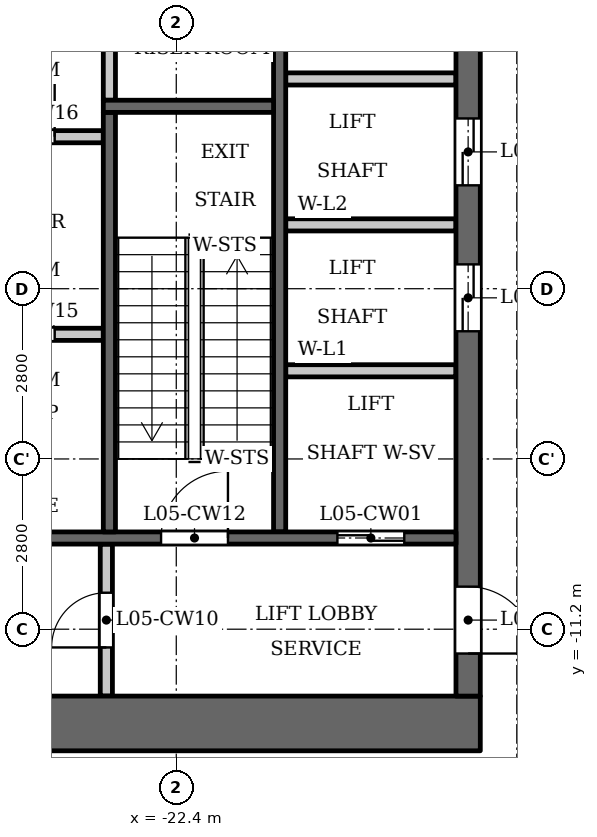
"""IFC4 building model, lengths in metres.
Left out: names, types, materials, properties, quantities, classifications, styles, units other than length and angle.
Written with IfcOpenShell. Run it as: python <this file> out.ifc"""

import sys

from ifc_helpers import new_model, si_unit, direction, frame, frame_2d, origin, place, context, subcontext, project, spatial, rectangle, extrude, element, fill, save


model = new_model("IFC4")
c1 = context("Model", 3, precision=1e-05, world=origin(), true_north=direction((0.0, 1.0)))
c2 = subcontext(c1, "Body", "Model", "MODEL_VIEW")
j1 = project(units=[si_unit("LENGTHUNIT", "METRE"), si_unit("PLANEANGLEUNIT", "RADIAN")], contexts=[c1])
p1 = place(None, origin())
s1 = spatial("IfcSite", under=j1, at=p1, CompositionType="ELEMENT")
p2 = place(p1, origin())
s2 = spatial("IfcBuilding", under=s1, at=p2, CompositionType="ELEMENT")
p3 = place(p2, frame((0.0, 0.0, 25.7)))
s3 = spatial("IfcBuildingStorey", under=s2, at=p3, CompositionType="ELEMENT", Elevation=25.7)
p4 = place(p3, frame((-23.5, -2.5, 0.0), z_axis=(0.0, 0.0, 1.0), x_axis=(0.0, 1.0, 0.0)))
e1 = element("IfcWall", 1, at=p4, inside=s3, PredefinedType="PARTITIONING", context=c2, shape_type="SweptSolid", body=[
    extrude(rectangle(XDim=2.65, YDim=0.2, at=frame_2d((1.325, 0.0))), origin(), (0.0, 0.0, 1.0), 4.45),
])
p5 = place(p3, frame((-20.7, -9.6, 0.0), z_axis=(0.0, 0.0, 1.0), x_axis=(0.0, 1.0, 0.0)))
e2 = element("IfcWall", 2, at=p5, inside=s3, PredefinedType="SHEAR", context=c2, shape_type="SweptSolid", body=[
    extrude(rectangle(XDim=9.75, YDim=0.2, at=frame_2d((4.875, 0.0))), origin(), (0.0, 0.0, 1.0), 4.45),
])
p6 = place(p3, frame((-17.4, -12.75, 0.0), z_axis=(0.0, 0.0, 1.0), x_axis=(-1.0, 0.0, 0.0)))
e3 = element("IfcWall", 3, at=p6, inside=s3, PredefinedType="SHEAR", context=c2, shape_type="SweptSolid", body=[
    extrude(rectangle(XDim=10.4, YDim=0.9, at=frame_2d((5.2, 0.0))), origin(), (0.0, 0.0, 1.0), 4.45),
])
p7 = place(p3, frame((-17.6, -12.3, 0.0), z_axis=(0.0, 0.0, 1.0), x_axis=(0.0, 1.0, 0.0)))
e4 = element("IfcWall", 4, at=p7, inside=s3, PredefinedType="SHEAR", context=c2, shape_type="SweptSolid", body=[
    extrude(rectangle(XDim=24.6, YDim=0.4, at=frame_2d((12.3, 0.0))), origin(), (0.0, 0.0, 1.0), 4.45),
])
p8 = place(p7, frame((6.0, 0.0, 0.0)))
e5 = element("IfcOpeningElement", 5, at=p8, cuts=e4, PredefinedType="OPENING", context=c2, shape_type="SweptSolid", body=[
    extrude(rectangle(XDim=1.1, YDim=2.1, at=frame_2d((0.55, 1.05))), frame((0.0, 0.21, 0.0), z_axis=(0.0, -1.0, 0.0), x_axis=(1.0, 0.0, 0.0)), (0.0, 0.0, 1.0), 0.42),
])
p9 = place(p7, frame((8.4, 0.0, 0.0)))
e6 = element("IfcOpeningElement", 6, at=p9, cuts=e4, PredefinedType="OPENING", context=c2, shape_type="SweptSolid", body=[
    extrude(rectangle(XDim=1.1, YDim=2.1, at=frame_2d((0.55, 1.05))), frame((0.0, 0.21, 0.0), z_axis=(0.0, -1.0, 0.0), x_axis=(1.0, 0.0, 0.0)), (0.0, 0.0, 1.0), 0.42),
])
p10 = place(p7, frame((10.8, 0.0, 0.0)))
e7 = element("IfcOpeningElement", 7, at=p10, cuts=e4, PredefinedType="OPENING", context=c2, shape_type="SweptSolid", body=[
    extrude(rectangle(XDim=1.1, YDim=2.1, at=frame_2d((0.55, 1.05))), frame((0.0, 0.21, 0.0), z_axis=(0.0, -1.0, 0.0), x_axis=(1.0, 0.0, 0.0)), (0.0, 0.0, 1.0), 0.42),
])
p11 = place(p7, frame((16.75, 0.0, 0.0)))
e8 = element("IfcOpeningElement", 8, at=p11, cuts=e4, PredefinedType="OPENING", context=c2, shape_type="SweptSolid", body=[
    extrude(rectangle(XDim=0.9, YDim=2.1, at=frame_2d((0.45, 1.05))), frame((0.0, 0.21, 0.0), z_axis=(0.0, -1.0, 0.0), x_axis=(1.0, 0.0, 0.0)), (0.0, 0.0, 1.0), 0.42),
])
p12 = place(p7, frame((22.8, 0.0, 0.0)))
e9 = element("IfcOpeningElement", 9, at=p12, cuts=e4, PredefinedType="OPENING", context=c2, shape_type="SweptSolid", body=[
    extrude(rectangle(XDim=1.1, YDim=2.1, at=frame_2d((0.55, 1.05))), frame((0.0, 0.21, 0.0), z_axis=(0.0, -1.0, 0.0), x_axis=(1.0, 0.0, 0.0)), (0.0, 0.0, 1.0), 0.42),
])
p13 = place(p7, frame((0.7, 0.0, 0.0)))
e10 = element("IfcOpeningElement", 10, at=p13, cuts=e4, PredefinedType="OPENING", context=c2, shape_type="SweptSolid", body=[
    extrude(rectangle(XDim=1.1, YDim=2.1, at=frame_2d((0.55, 1.05))), frame((0.0, 0.21, 0.0), z_axis=(0.0, -1.0, 0.0), x_axis=(1.0, 0.0, 0.0)), (0.0, 0.0, 1.0), 0.42),
])
p14 = place(p7, frame((12.775, 0.0, 0.0)))
e11 = element("IfcOpeningElement", 11, at=p14, cuts=e4, PredefinedType="OPENING", context=c2, shape_type="SweptSolid", body=[
    extrude(rectangle(XDim=1.8, YDim=2.1, at=frame_2d((0.9, 1.05))), frame((0.0, 0.21, 0.0), z_axis=(0.0, -1.0, 0.0), x_axis=(1.0, 0.0, 0.0)), (0.0, 0.0, 1.0), 0.42),
])
p15 = place(p3, frame((-23.55, -12.3, 0.0), z_axis=(0.0, 0.0, 1.0), x_axis=(0.0, 1.0, 0.0)))
e12 = element("IfcWall", 12, at=p15, inside=s3, PredefinedType="PARTITIONING", context=c2, shape_type="SweptSolid", body=[
    extrude(rectangle(XDim=2.5, YDim=0.2, at=frame_2d((1.25, 0.0))), origin(), (0.0, 0.0, 1.0), 4.45),
])
p16 = place(p15, frame((0.8, 0.0, 0.0)))
e13 = element("IfcOpeningElement", 13, at=p16, cuts=e12, PredefinedType="OPENING", context=c2, shape_type="SweptSolid", body=[
    extrude(rectangle(XDim=0.9, YDim=2.1, at=frame_2d((0.45, 1.05))), frame((0.0, 0.11, 0.0), z_axis=(0.0, -1.0, 0.0), x_axis=(1.0, 0.0, 0.0)), (0.0, 0.0, 1.0), 0.22),
])
p17 = place(p3, frame((-23.6, -6.35, 0.0), z_axis=(0.0, 0.0, 1.0), x_axis=(-1.0, 0.0, 0.0)))
e14 = element("IfcWall", 14, at=p17, inside=s3, PredefinedType="PARTITIONING", context=c2, shape_type="SweptSolid", body=[
    extrude(rectangle(XDim=2.5, YDim=0.2, at=frame_2d((1.25, 0.0))), origin(), (0.0, 0.0, 1.0), 4.45),
])
p18 = place(p17, frame((0.8, 0.0, 0.0)))
e15 = element("IfcOpeningElement", 15, at=p18, cuts=e14, PredefinedType="OPENING", context=c2, shape_type="SweptSolid", body=[
    extrude(rectangle(XDim=0.9, YDim=2.1, at=frame_2d((0.45, 1.05))), frame((0.0, 0.11, 0.0), z_axis=(0.0, -1.0, 0.0), x_axis=(1.0, 0.0, 0.0)), (0.0, 0.0, 1.0), 0.22),
])
p19 = place(p3, frame((-23.6, -3.1, 0.0), z_axis=(0.0, 0.0, 1.0), x_axis=(-1.0, 0.0, 0.0)))
e16 = element("IfcWall", 16, at=p19, inside=s3, PredefinedType="PARTITIONING", context=c2, shape_type="SweptSolid", body=[
    extrude(rectangle(XDim=2.5, YDim=0.2, at=frame_2d((1.25, 0.0))), origin(), (0.0, 0.0, 1.0), 4.45),
])
p20 = place(p19, frame((0.8, 0.0, 0.0)))
e17 = element("IfcOpeningElement", 17, at=p20, cuts=e16, PredefinedType="OPENING", context=c2, shape_type="SweptSolid", body=[
    extrude(rectangle(XDim=0.9, YDim=2.1, at=frame_2d((0.45, 1.05))), frame((0.0, 0.11, 0.0), z_axis=(0.0, -1.0, 0.0), x_axis=(1.0, 0.0, 0.0)), (0.0, 0.0, 1.0), 0.22),
])
p21 = place(p3, frame((-17.8, -9.7, 0.0), z_axis=(0.0, 0.0, 1.0), x_axis=(-1.0, 0.0, 0.0)))
e18 = element("IfcWall", 18, at=p21, inside=s3, PredefinedType="SHEAR", context=c2, shape_type="SweptSolid", body=[
    extrude(rectangle(XDim=8.3, YDim=0.2, at=frame_2d((4.15, 0.0))), origin(), (0.0, 0.0, 1.0), 4.45),
])
p22 = place(p21, frame((0.85, 0.0, 0.0)))
e19 = element("IfcOpeningElement", 19, at=p22, cuts=e18, PredefinedType="OPENING", context=c2, shape_type="SweptSolid", body=[
    extrude(rectangle(XDim=1.1, YDim=2.1, at=frame_2d((0.55, 1.05))), frame((0.0, 0.11, 0.0), z_axis=(0.0, -1.0, 0.0), x_axis=(1.0, 0.0, 0.0)), (0.0, 0.0, 1.0), 0.22),
])
p23 = place(p21, frame((3.75, 0.0, 0.0)))
e20 = element("IfcOpeningElement", 20, at=p23, cuts=e18, PredefinedType="OPENING", context=c2, shape_type="SweptSolid", body=[
    extrude(rectangle(XDim=1.1, YDim=2.1, at=frame_2d((0.55, 1.05))), frame((0.0, 0.11, 0.0), z_axis=(0.0, -1.0, 0.0), x_axis=(1.0, 0.0, 0.0)), (0.0, 0.0, 1.0), 0.22),
])
for number, where, z_axis, x_axis in (
    (21, (-17.8, -6.95, 0.0), (0.0, 0.0, 1.0), (-1.0, 0.0, 0.0)),
    (22, (-17.8, -4.55, 0.0), (0.0, 0.0, 1.0), (-1.0, 0.0, 0.0)),
    (23, (-17.8, -2.15, 0.0), (0.0, 0.0, 1.0), (-1.0, 0.0, 0.0)),
):
    element("IfcWall", number, at=place(p3, frame(where, z_axis=z_axis, x_axis=x_axis)), inside=s3, PredefinedType="PARTITIONING", context=c2, shape_type="SweptSolid", body=[
        extrude(rectangle(XDim=2.8, YDim=0.2, at=frame_2d((1.4, 0.0))), origin(), (0.0, 0.0, 1.0), 4.45),
    ])
p24 = place(p3, frame((-23.5, -9.6, 0.0), z_axis=(0.0, 0.0, 1.0), x_axis=(0.0, 1.0, 0.0)))
e24 = element("IfcWall", 24, at=p24, inside=s3, PredefinedType="SHEAR", context=c2, shape_type="SweptSolid", body=[
    extrude(rectangle(XDim=6.9, YDim=0.2, at=frame_2d((3.45, 0.0))), origin(), (0.0, 0.0, 1.0), 4.45),
])
p25 = place(p3, frame((-20.8, -2.6, 0.0), z_axis=(0.0, 0.0, 1.0), x_axis=(-1.0, 0.0, 0.0)))
e25 = element("IfcWall", 25, at=p25, inside=s3, PredefinedType="SHEAR", context=c2, shape_type="SweptSolid", body=[
    extrude(rectangle(XDim=2.8, YDim=0.2, at=frame_2d((1.4, 0.0))), origin(), (0.0, 0.0, 1.0), 4.45),
])
p26 = place(p22, origin())
e26 = element("IfcDoor", 26, at=p26, inside=s3, OperationType="DOUBLE_DOOR_SLIDING", PredefinedType="DOOR", context=c2, shape_type="SweptSolid", body=[
    extrude(rectangle(XDim=1.1, YDim=2.1, at=frame_2d((0.55, 1.05))), frame((0.0, 0.025, 0.0), z_axis=(0.0, -1.0, 0.0), x_axis=(1.0, 0.0, 0.0)), (0.0, 0.0, 1.0), 0.05),
])
fill(e19, e26)
p27 = place(p8, origin())
e27 = element("IfcDoor", 27, at=p27, inside=s3, OperationType="DOUBLE_DOOR_SLIDING", PredefinedType="DOOR", context=c2, shape_type="SweptSolid", body=[
    extrude(rectangle(XDim=1.1, YDim=2.1, at=frame_2d((0.55, 1.05))), frame((0.0, 0.025, 0.0), z_axis=(0.0, -1.0, 0.0), x_axis=(1.0, 0.0, 0.0)), (0.0, 0.0, 1.0), 0.05),
])
fill(e5, e27)
p28 = place(p9, origin())
e28 = element("IfcDoor", 28, at=p28, inside=s3, OperationType="DOUBLE_DOOR_SLIDING", PredefinedType="DOOR", context=c2, shape_type="SweptSolid", body=[
    extrude(rectangle(XDim=1.1, YDim=2.1, at=frame_2d((0.55, 1.05))), frame((0.0, 0.025, 0.0), z_axis=(0.0, -1.0, 0.0), x_axis=(1.0, 0.0, 0.0)), (0.0, 0.0, 1.0), 0.05),
])
fill(e6, e28)
p29 = place(p13, origin())
e29 = element("IfcDoor", 29, at=p29, inside=s3, OperationType="SINGLE_SWING_LEFT", PredefinedType="DOOR", context=c2, shape_type="SweptSolid", body=[
    extrude(rectangle(XDim=1.1, YDim=2.1, at=frame_2d((0.55, 1.05))), frame((0.0, 0.025, 0.0), z_axis=(0.0, -1.0, 0.0), x_axis=(1.0, 0.0, 0.0)), (0.0, 0.0, 1.0), 0.05),
])
fill(e10, e29)
p30 = place(p16, origin())
e30 = element("IfcDoor", 30, at=p30, inside=s3, OperationType="SINGLE_SWING_RIGHT", PredefinedType="DOOR", context=c2, shape_type="SweptSolid", body=[
    extrude(rectangle(XDim=0.9, YDim=2.1, at=frame_2d((0.45, 1.05))), frame((0.0, 0.025, 0.0), z_axis=(0.0, -1.0, 0.0), x_axis=(1.0, 0.0, 0.0)), (0.0, 0.0, 1.0), 0.05),
])
fill(e13, e30)
p31 = place(p23, origin())
e31 = element("IfcDoor", 31, at=p31, inside=s3, OperationType="SINGLE_SWING_LEFT", PredefinedType="DOOR", context=c2, shape_type="SweptSolid", body=[
    extrude(rectangle(XDim=1.1, YDim=2.1, at=frame_2d((0.55, 1.05))), frame((0.0, 0.025, 0.0), z_axis=(0.0, -1.0, 0.0), x_axis=(1.0, 0.0, 0.0)), (0.0, 0.0, 1.0), 0.05),
])
fill(e20, e31)
p32 = place(p18, origin())
e32 = element("IfcDoor", 32, at=p32, inside=s3, OperationType="SINGLE_SWING_RIGHT", PredefinedType="DOOR", context=c2, shape_type="SweptSolid", body=[
    extrude(rectangle(XDim=0.9, YDim=2.1, at=frame_2d((0.45, 1.05))), frame((0.0, 0.025, 0.0), z_axis=(0.0, -1.0, 0.0), x_axis=(1.0, 0.0, 0.0)), (0.0, 0.0, 1.0), 0.05),
])
fill(e15, e32)
p33 = place(p20, origin())
e33 = element("IfcDoor", 33, at=p33, inside=s3, OperationType="SINGLE_SWING_LEFT", PredefinedType="DOOR", context=c2, shape_type="SweptSolid", body=[
    extrude(rectangle(XDim=0.9, YDim=2.1, at=frame_2d((0.45, 1.05))), frame((0.0, 0.025, 0.0), z_axis=(0.0, -1.0, 0.0), x_axis=(1.0, 0.0, 0.0)), (0.0, 0.0, 1.0), 0.05),
])
fill(e17, e33)
save(model, sys.argv[1])
